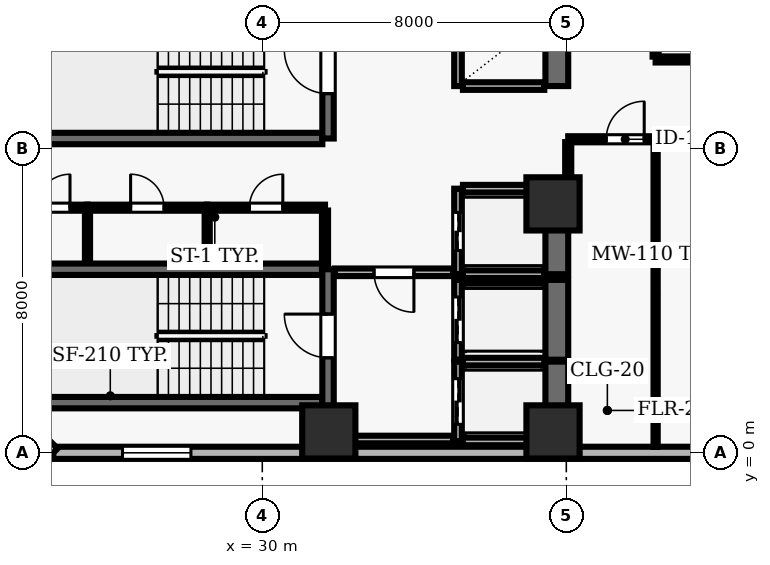
"""IFC4 building model, lengths in metres.
Left out: names, types, materials, properties, quantities, classifications, styles, units other than length and angle.
Written with IfcOpenShell. Run it as: python <this file> out.ifc"""

import sys

from ifc_helpers import new_model, si_unit, direction, frame, frame_2d, origin, origin_2d, place, context, subcontext, project, spatial, rectangle, extrude, element, fill, save


model = new_model("IFC4")
c1 = context("Model", 3, precision=1e-05, world=origin(), true_north=direction((0.0, 1.0)))
c2 = subcontext(c1, "Body", "Model", "MODEL_VIEW")
j1 = project(units=[si_unit("LENGTHUNIT", "METRE"), si_unit("PLANEANGLEUNIT", "RADIAN")], contexts=[c1])
p1 = place(None, origin())
s1 = spatial("IfcSite", under=j1, at=p1, CompositionType="ELEMENT")
p2 = place(p1, origin())
s2 = spatial("IfcBuilding", under=s1, at=p2, CompositionType="ELEMENT")
p3 = place(p2, frame((0.0, 0.0, 31.0)))
s3 = spatial("IfcBuildingStorey", under=s2, at=p3, CompositionType="ELEMENT", Elevation=31.0)
for number, where, z_axis, x_axis in (
    (1, (31.75, 0.55, 0.0), (0.0, 0.0, 1.0), (1.0, 0.0, 0.0)),
    (2, (37.65, 0.55, 0.0), (0.0, 0.0, 1.0), (1.0, 0.0, 0.0)),
    (3, (37.65, 6.55, 0.0), (0.0, 0.0, 1.0), (1.0, 0.0, 0.0)),
):
    element("IfcColumn", number, at=place(p3, frame(where, z_axis=z_axis, x_axis=x_axis)), inside=s3, PredefinedType="COLUMN", context=c2, shape_type="SweptSolid", body=[
        extrude(rectangle(XDim=1.4, YDim=1.4, at=origin_2d()), origin(), (0.0, 0.0, 1.0), 3.9),
    ])
p4 = place(p3, frame((24.5, 0.0, 0.0), z_axis=(0.0, 0.0, 1.0), x_axis=(1.0, 0.0, 0.0)))
e4 = element("IfcWall", 4, at=p4, inside=s3, PredefinedType="SOLIDWALL", context=c2, shape_type="SweptSolid", body=[
    extrude(rectangle(XDim=49.0, YDim=0.32, at=frame_2d((24.5, 0.0))), origin(), (0.0, 0.0, 1.0), 3.69),
])
p5 = place(p4, frame((1.822, 0.0, 0.9)))
e5 = element("IfcOpeningElement", 5, at=p5, cuts=e4, PredefinedType="OPENING", context=c2, shape_type="SweptSolid", body=[
    extrude(rectangle(XDim=1.8, YDim=1.8, at=frame_2d((0.9, 0.9))), frame((0.0, 0.17, 0.0), z_axis=(0.0, -1.0, 0.0), x_axis=(1.0, 0.0, 0.0)), (0.0, 0.0, 1.0), 0.34),
])
p6 = place(p4, frame((18.156, 0.0, 0.9)))
e6 = element("IfcOpeningElement", 6, at=p6, cuts=e4, PredefinedType="OPENING", context=c2, shape_type="SweptSolid", body=[
    extrude(rectangle(XDim=1.8, YDim=1.8, at=frame_2d((0.9, 0.9))), frame((0.0, 0.17, 0.0), z_axis=(0.0, -1.0, 0.0), x_axis=(1.0, 0.0, 0.0)), (0.0, 0.0, 1.0), 0.34),
])
p7 = place(p4, frame((23.6, 0.0, 0.9)))
e7 = element("IfcOpeningElement", 7, at=p7, cuts=e4, PredefinedType="OPENING", context=c2, shape_type="SweptSolid", body=[
    extrude(rectangle(XDim=1.8, YDim=1.8, at=frame_2d((0.9, 0.9))), frame((0.0, 0.17, 0.0), z_axis=(0.0, -1.0, 0.0), x_axis=(1.0, 0.0, 0.0)), (0.0, 0.0, 1.0), 0.34),
])
p8 = place(p4, frame((29.044, 0.0, 0.9)))
e8 = element("IfcOpeningElement", 8, at=p8, cuts=e4, PredefinedType="OPENING", context=c2, shape_type="SweptSolid", body=[
    extrude(rectangle(XDim=1.8, YDim=1.8, at=frame_2d((0.9, 0.9))), frame((0.0, 0.17, 0.0), z_axis=(0.0, -1.0, 0.0), x_axis=(1.0, 0.0, 0.0)), (0.0, 0.0, 1.0), 0.34),
])
p9 = place(p4, frame((34.489, 0.0, 0.9)))
e9 = element("IfcOpeningElement", 9, at=p9, cuts=e4, PredefinedType="OPENING", context=c2, shape_type="SweptSolid", body=[
    extrude(rectangle(XDim=1.8, YDim=1.8, at=frame_2d((0.9, 0.9))), frame((0.0, 0.17, 0.0), z_axis=(0.0, -1.0, 0.0), x_axis=(1.0, 0.0, 0.0)), (0.0, 0.0, 1.0), 0.34),
])
p10 = place(p4, frame((40.383, 0.0, 0.9)))
e10 = element("IfcOpeningElement", 10, at=p10, cuts=e4, PredefinedType="OPENING", context=c2, shape_type="SweptSolid", body=[
    extrude(rectangle(XDim=1.8, YDim=1.8, at=frame_2d((0.9, 0.9))), frame((0.0, 0.17, 0.0), z_axis=(0.0, -1.0, 0.0), x_axis=(1.0, 0.0, 0.0)), (0.0, 0.0, 1.0), 0.34),
])
p11 = place(p4, frame((45.378, 0.0, 0.9)))
e11 = element("IfcOpeningElement", 11, at=p11, cuts=e4, PredefinedType="OPENING", context=c2, shape_type="SweptSolid", body=[
    extrude(rectangle(XDim=1.8, YDim=1.8, at=frame_2d((0.9, 0.9))), frame((0.0, 0.17, 0.0), z_axis=(0.0, -1.0, 0.0), x_axis=(1.0, 0.0, 0.0)), (0.0, 0.0, 1.0), 0.34),
])
p12 = place(p3, frame((22.0, 2.5, 0.0), z_axis=(0.0, 0.0, 1.0), x_axis=(0.707106781187, -0.707106781187, 0.0)))
e12 = element("IfcWall", 12, at=p12, inside=s3, PredefinedType="SOLIDWALL", context=c2, shape_type="SweptSolid", body=[
    extrude(rectangle(XDim=3.536, YDim=0.32, at=frame_2d((1.768, 0.0))), origin(), (0.0, 0.0, 1.0), 3.69),
])
for number, where, z_axis, x_axis in (
    (13, (31.58, 4.83, 0.0), (0.0, 0.0, 1.0), (-1.0, 0.0, 0.0)),
    (14, (23.22, 1.32, 0.0), (0.0, 0.0, 1.0), (1.0, 0.0, 0.0)),
):
    element("IfcWall", number, at=place(p3, frame(where, z_axis=z_axis, x_axis=x_axis)), inside=s3, PredefinedType="SHEAR", context=c2, shape_type="SweptSolid", body=[
        extrude(rectangle(XDim=8.36, YDim=0.3, at=frame_2d((4.18, 0.0))), origin(), (0.0, 0.0, 1.0), 3.69),
    ])
p13 = place(p3, frame((31.73, 0.96, 0.0), z_axis=(0.0, 0.0, 1.0), x_axis=(0.0, 1.0, 0.0)))
e15 = element("IfcWall", 15, at=p13, inside=s3, PredefinedType="SHEAR", context=c2, shape_type="SweptSolid", body=[
    extrude(rectangle(XDim=3.87, YDim=0.3, at=frame_2d((1.935, 0.0))), origin(), (0.0, 0.0, 1.0), 3.69),
])
p14 = place(p13, frame((1.54, 0.0, 0.0)))
e16 = element("IfcOpeningElement", 16, at=p14, cuts=e15, PredefinedType="OPENING", context=c2, shape_type="SweptSolid", body=[
    extrude(rectangle(XDim=1.15, YDim=2.15, at=frame_2d((0.575, 1.075))), frame((0.0, 0.16, 0.0), z_axis=(0.0, -1.0, 0.0), x_axis=(1.0, 0.0, 0.0)), (0.0, 0.0, 1.0), 0.32),
])
p15 = place(p3, frame((23.22, 8.27, 0.0), z_axis=(0.0, 0.0, 1.0), x_axis=(1.0, 0.0, 0.0)))
e17 = element("IfcWall", 17, at=p15, inside=s3, PredefinedType="SHEAR", context=c2, shape_type="SweptSolid", body=[
    extrude(rectangle(XDim=8.36, YDim=0.3, at=frame_2d((4.18, 0.0))), origin(), (0.0, 0.0, 1.0), 3.69),
])
p16 = place(p3, frame((31.73, 8.27, 0.0), z_axis=(0.0, 0.0, 1.0), x_axis=(0.0, 1.0, 0.0)))
e18 = element("IfcWall", 18, at=p16, inside=s3, PredefinedType="SHEAR", context=c2, shape_type="SweptSolid", body=[
    extrude(rectangle(XDim=3.51, YDim=0.3, at=frame_2d((1.755, 0.0))), origin(), (0.0, 0.0, 1.0), 3.69),
])
p17 = place(p16, frame((1.18, 0.0, 0.0)))
e19 = element("IfcOpeningElement", 19, at=p17, cuts=e18, PredefinedType="OPENING", context=c2, shape_type="SweptSolid", body=[
    extrude(rectangle(XDim=1.15, YDim=2.15, at=frame_2d((0.575, 1.075))), frame((0.0, 0.16, 0.0), z_axis=(0.0, -1.0, 0.0), x_axis=(1.0, 0.0, 0.0)), (0.0, 0.0, 1.0), 0.32),
])
p18 = place(p3, frame((35.15, 2.4, 0.0), z_axis=(0.0, 0.0, 1.0), x_axis=(0.0, -1.0, 0.0)))
e20 = element("IfcWall", 20, at=p18, inside=s3, PredefinedType="SOLIDWALL", context=c2, shape_type="SweptSolid", body=[
    extrude(rectangle(XDim=2.1, YDim=0.2, at=frame_2d((1.05, 0.0))), origin(), (0.0, 0.0, 1.0), 3.69),
])
p19 = place(p18, frame((0.45, 0.0, 0.0)))
e21 = element("IfcOpeningElement", 21, at=p19, cuts=e20, PredefinedType="OPENING", context=c2, shape_type="SweptSolid", body=[
    extrude(rectangle(XDim=1.2, YDim=2.15, at=frame_2d((0.6, 1.075))), frame((0.0, 0.11, 0.0), z_axis=(0.0, -1.0, 0.0), x_axis=(1.0, 0.0, 0.0)), (0.0, 0.0, 1.0), 0.22),
])
p20 = place(p3, frame((37.75, 0.3, 0.0), z_axis=(0.0, 0.0, 1.0), x_axis=(0.0, 1.0, 0.0)))
e22 = element("IfcWall", 22, at=p20, inside=s3, PredefinedType="SHEAR", context=c2, shape_type="SweptSolid", body=[
    extrude(rectangle(XDim=2.1, YDim=0.6, at=frame_2d((1.05, 0.0))), origin(), (0.0, 0.0, 1.0), 3.69),
])
for number, where, z_axis, x_axis in (
    (23, (35.28, 0.3, 0.0), (0.0, 0.0, 1.0), (1.0, 0.0, 0.0)),
    (24, (37.42, 2.4, 0.0), (0.0, 0.0, 1.0), (-1.0, 0.0, 0.0)),
):
    element("IfcWall", number, at=place(p3, frame(where, z_axis=z_axis, x_axis=x_axis)), inside=s3, PredefinedType="SOLIDWALL", context=c2, shape_type="SweptSolid", body=[
        extrude(rectangle(XDim=2.14, YDim=0.2, at=frame_2d((1.07, 0.0))), origin(), (0.0, 0.0, 1.0), 3.69),
    ])
p21 = place(p3, frame((35.15, 4.55, 0.0), z_axis=(0.0, 0.0, 1.0), x_axis=(0.0, -1.0, 0.0)))
e25 = element("IfcWall", 25, at=p21, inside=s3, PredefinedType="SOLIDWALL", context=c2, shape_type="SweptSolid", body=[
    extrude(rectangle(XDim=2.1, YDim=0.2, at=frame_2d((1.05, 0.0))), origin(), (0.0, 0.0, 1.0), 3.69),
])
p22 = place(p21, frame((0.45, 0.0, 0.0)))
e26 = element("IfcOpeningElement", 26, at=p22, cuts=e25, PredefinedType="OPENING", context=c2, shape_type="SweptSolid", body=[
    extrude(rectangle(XDim=1.2, YDim=2.15, at=frame_2d((0.6, 1.075))), frame((0.0, 0.11, 0.0), z_axis=(0.0, -1.0, 0.0), x_axis=(1.0, 0.0, 0.0)), (0.0, 0.0, 1.0), 0.22),
])
p23 = place(p3, frame((37.75, 2.45, 0.0), z_axis=(0.0, 0.0, 1.0), x_axis=(0.0, 1.0, 0.0)))
e27 = element("IfcWall", 27, at=p23, inside=s3, PredefinedType="SHEAR", context=c2, shape_type="SweptSolid", body=[
    extrude(rectangle(XDim=2.1, YDim=0.6, at=frame_2d((1.05, 0.0))), origin(), (0.0, 0.0, 1.0), 3.69),
])
p24 = place(p3, frame((37.42, 4.55, 0.0), z_axis=(0.0, 0.0, 1.0), x_axis=(-1.0, 0.0, 0.0)))
e28 = element("IfcWall", 28, at=p24, inside=s3, PredefinedType="SOLIDWALL", context=c2, shape_type="SweptSolid", body=[
    extrude(rectangle(XDim=2.14, YDim=0.2, at=frame_2d((1.07, 0.0))), origin(), (0.0, 0.0, 1.0), 3.69),
])
p25 = place(p3, frame((35.15, 6.95, 0.0), z_axis=(0.0, 0.0, 1.0), x_axis=(0.0, -1.0, 0.0)))
e29 = element("IfcWall", 29, at=p25, inside=s3, PredefinedType="SOLIDWALL", context=c2, shape_type="SweptSolid", body=[
    extrude(rectangle(XDim=2.25, YDim=0.2, at=frame_2d((1.125, 0.0))), origin(), (0.0, 0.0, 1.0), 3.69),
])
p26 = place(p25, frame((0.625, 0.0, 0.0)))
e30 = element("IfcOpeningElement", 30, at=p26, cuts=e29, PredefinedType="OPENING", context=c2, shape_type="SweptSolid", body=[
    extrude(rectangle(XDim=1.0, YDim=2.1, at=frame_2d((0.5, 1.05))), frame((0.0, 0.11, 0.0), z_axis=(0.0, -1.0, 0.0), x_axis=(1.0, 0.0, 0.0)), (0.0, 0.0, 1.0), 0.22),
])
p27 = place(p3, frame((37.75, 4.7, 0.0), z_axis=(0.0, 0.0, 1.0), x_axis=(0.0, 1.0, 0.0)))
e31 = element("IfcWall", 31, at=p27, inside=s3, PredefinedType="SHEAR", context=c2, shape_type="SweptSolid", body=[
    extrude(rectangle(XDim=2.25, YDim=0.6, at=frame_2d((1.125, 0.0))), origin(), (0.0, 0.0, 1.0), 3.69),
])
for number, where, z_axis, x_axis in (
    (32, (35.28, 4.7, 0.0), (0.0, 0.0, 1.0), (1.0, 0.0, 0.0)),
    (33, (37.42, 6.95, 0.0), (0.0, 0.0, 1.0), (-1.0, 0.0, 0.0)),
):
    element("IfcWall", number, at=place(p3, frame(where, z_axis=z_axis, x_axis=x_axis)), inside=s3, PredefinedType="SOLIDWALL", context=c2, shape_type="SweptSolid", body=[
        extrude(rectangle(XDim=2.14, YDim=0.2, at=frame_2d((1.07, 0.0))), origin(), (0.0, 0.0, 1.0), 3.69),
    ])
p28 = place(p3, frame((35.15, 11.55, 0.0), z_axis=(0.0, 0.0, 1.0), x_axis=(0.0, -1.0, 0.0)))
e34 = element("IfcWall", 34, at=p28, inside=s3, PredefinedType="SOLIDWALL", context=c2, shape_type="SweptSolid", body=[
    extrude(rectangle(XDim=1.9, YDim=0.2, at=frame_2d((0.95, 0.0))), origin(), (0.0, 0.0, 1.0), 3.69),
])
p29 = place(p3, frame((37.75, 9.65, 0.0), z_axis=(0.0, 0.0, 1.0), x_axis=(0.0, 1.0, 0.0)))
e35 = element("IfcWall", 35, at=p29, inside=s3, PredefinedType="SHEAR", context=c2, shape_type="SweptSolid", body=[
    extrude(rectangle(XDim=1.9, YDim=0.6, at=frame_2d((0.95, 0.0))), origin(), (0.0, 0.0, 1.0), 3.69),
])
p30 = place(p3, frame((35.28, 9.65, 0.0), z_axis=(0.0, 0.0, 1.0), x_axis=(1.0, 0.0, 0.0)))
e36 = element("IfcWall", 36, at=p30, inside=s3, PredefinedType="SOLIDWALL", context=c2, shape_type="SweptSolid", body=[
    extrude(rectangle(XDim=2.14, YDim=0.2, at=frame_2d((1.07, 0.0))), origin(), (0.0, 0.0, 1.0), 3.69),
])
p31 = place(p3, frame((22.2, 6.45, 0.0), z_axis=(0.0, 0.0, 1.0), x_axis=(1.0, 0.0, 0.0)))
e37 = element("IfcWall", 37, at=p31, inside=s3, PredefinedType="PARTITIONING", context=c2, shape_type="SweptSolid", body=[
    extrude(rectangle(XDim=3.2, YDim=0.16, at=frame_2d((1.6, 0.0))), origin(), (0.0, 0.0, 1.0), 3.69),
])
p32 = place(p31, frame((1.86, 0.0, 0.0)))
e38 = element("IfcOpeningElement", 38, at=p32, cuts=e37, PredefinedType="OPENING", context=c2, shape_type="SweptSolid", body=[
    extrude(rectangle(XDim=0.88, YDim=2.1, at=frame_2d((0.44, 1.05))), frame((0.0, 0.09, 0.0), z_axis=(0.0, -1.0, 0.0), x_axis=(1.0, 0.0, 0.0)), (0.0, 0.0, 1.0), 0.18),
])
p33 = place(p3, frame((25.4, 6.45, 0.0), z_axis=(0.0, 0.0, 1.0), x_axis=(1.0, 0.0, 0.0)))
e39 = element("IfcWall", 39, at=p33, inside=s3, PredefinedType="PARTITIONING", context=c2, shape_type="SweptSolid", body=[
    extrude(rectangle(XDim=3.15, YDim=0.16, at=frame_2d((1.575, 0.0))), origin(), (0.0, 0.0, 1.0), 3.69),
])
p34 = place(p33, frame((1.135, 0.0, 0.0)))
e40 = element("IfcOpeningElement", 40, at=p34, cuts=e39, PredefinedType="OPENING", context=c2, shape_type="SweptSolid", body=[
    extrude(rectangle(XDim=0.88, YDim=2.1, at=frame_2d((0.44, 1.05))), frame((0.0, 0.09, 0.0), z_axis=(0.0, -1.0, 0.0), x_axis=(1.0, 0.0, 0.0)), (0.0, 0.0, 1.0), 0.18),
])
p35 = place(p3, frame((28.55, 6.45, 0.0), z_axis=(0.0, 0.0, 1.0), x_axis=(1.0, 0.0, 0.0)))
e41 = element("IfcWall", 41, at=p35, inside=s3, PredefinedType="PARTITIONING", context=c2, shape_type="SweptSolid", body=[
    extrude(rectangle(XDim=3.1, YDim=0.16, at=frame_2d((1.55, 0.0))), origin(), (0.0, 0.0, 1.0), 3.69),
])
p36 = place(p35, frame((1.11, 0.0, 0.0)))
e42 = element("IfcOpeningElement", 42, at=p36, cuts=e41, PredefinedType="OPENING", context=c2, shape_type="SweptSolid", body=[
    extrude(rectangle(XDim=0.88, YDim=2.1, at=frame_2d((0.44, 1.05))), frame((0.0, 0.09, 0.0), z_axis=(0.0, -1.0, 0.0), x_axis=(1.0, 0.0, 0.0)), (0.0, 0.0, 1.0), 0.18),
])
p37 = place(p3, frame((31.65, 0.35, 0.0), z_axis=(0.0, 0.0, 1.0), x_axis=(1.0, 0.0, 0.0)))
e43 = element("IfcWall", 43, at=p37, inside=s3, PredefinedType="SOLIDWALL", context=c2, shape_type="SweptSolid", body=[
    extrude(rectangle(XDim=3.37, YDim=0.2, at=frame_2d((1.685, 0.0))), origin(), (0.0, 0.0, 1.0), 3.69),
])
p38 = place(p3, frame((35.02, 4.75, 0.0), z_axis=(0.0, 0.0, 1.0), x_axis=(-1.0, 0.0, 0.0)))
e44 = element("IfcWall", 44, at=p38, inside=s3, PredefinedType="SOLIDWALL", context=c2, shape_type="SweptSolid", body=[
    extrude(rectangle(XDim=3.11, YDim=0.2, at=frame_2d((1.555, 0.0))), origin(), (0.0, 0.0, 1.0), 3.69),
])
p39 = place(p38, frame((1.03, 0.0, 0.0)))
e45 = element("IfcOpeningElement", 45, at=p39, cuts=e44, PredefinedType="OPENING", context=c2, shape_type="SweptSolid", body=[
    extrude(rectangle(XDim=1.05, YDim=2.15, at=frame_2d((0.525, 1.075))), frame((0.0, 0.11, 0.0), z_axis=(0.0, -1.0, 0.0), x_axis=(1.0, 0.0, 0.0)), (0.0, 0.0, 1.0), 0.22),
])
p40 = place(p3, frame((38.05, 8.25, 0.0), z_axis=(0.0, 0.0, 1.0), x_axis=(1.0, 0.0, 0.0)))
e46 = element("IfcWall", 46, at=p40, inside=s3, PredefinedType="PARTITIONING", context=c2, shape_type="SweptSolid", body=[
    extrude(rectangle(XDim=2.3, YDim=0.16, at=frame_2d((1.15, 0.0))), origin(), (0.0, 0.0, 1.0), 2.995),
])
p41 = place(p40, frame((1.0, 0.0, 0.0)))
e47 = element("IfcOpeningElement", 47, at=p41, cuts=e46, PredefinedType="OPENING", context=c2, shape_type="SweptSolid", body=[
    extrude(rectangle(XDim=1.0, YDim=2.1, at=frame_2d((0.5, 1.05))), frame((0.0, 0.09, 0.0), z_axis=(0.0, -1.0, 0.0), x_axis=(1.0, 0.0, 0.0)), (0.0, 0.0, 1.0), 0.18),
])
p42 = place(p3, frame((40.35, 8.25, 0.0), z_axis=(0.0, 0.0, 1.0), x_axis=(1.0, 0.0, 0.0)))
e48 = element("IfcWall", 48, at=p42, inside=s3, PredefinedType="PARTITIONING", context=c2, shape_type="SweptSolid", body=[
    extrude(rectangle(XDim=11.65, YDim=0.16, at=frame_2d((5.825, 0.0))), origin(), (0.0, 0.0, 1.0), 2.995),
])
p43 = place(p42, frame((7.475, 0.0, 0.0)))
e49 = element("IfcOpeningElement", 49, at=p43, cuts=e48, PredefinedType="OPENING", context=c2, shape_type="SweptSolid", body=[
    extrude(rectangle(XDim=0.9, YDim=2.1, at=frame_2d((0.45, 1.05))), frame((0.0, 0.09, 0.0), z_axis=(0.0, -1.0, 0.0), x_axis=(1.0, 0.0, 0.0)), (0.0, 0.0, 1.0), 0.18),
])
p44 = place(p3, frame((52.0, 10.35, 0.0), z_axis=(0.0, 0.0, 1.0), x_axis=(-1.0, 0.0, 0.0)))
e50 = element("IfcWall", 50, at=p44, inside=s3, PredefinedType="PARTITIONING", context=c2, shape_type="SweptSolid", body=[
    extrude(rectangle(XDim=11.65, YDim=0.16, at=frame_2d((5.825, 0.0))), origin(), (0.0, 0.0, 1.0), 3.227),
])
p45 = place(p44, frame((5.325, 0.0, 0.0)))
e51 = element("IfcOpeningElement", 51, at=p45, cuts=e50, PredefinedType="OPENING", context=c2, shape_type="SweptSolid", body=[
    extrude(rectangle(XDim=1.0, YDim=2.1, at=frame_2d((0.5, 1.05))), frame((0.0, 0.09, 0.0), z_axis=(0.0, -1.0, 0.0), x_axis=(1.0, 0.0, 0.0)), (0.0, 0.0, 1.0), 0.18),
])
for number, where, z_axis, x_axis in (
    (52, (25.4, 5.01, 0.0), (0.0, 0.0, 1.0), (0.0, 1.0, 0.0)),
    (53, (28.55, 5.01, 0.0), (0.0, 0.0, 1.0), (0.0, 1.0, 0.0)),
):
    element("IfcWall", number, at=place(p3, frame(where, z_axis=z_axis, x_axis=x_axis)), inside=s3, PredefinedType="PARTITIONING", context=c2, shape_type="SweptSolid", body=[
        extrude(rectangle(XDim=1.365, YDim=0.135, at=frame_2d((0.683, 0.0))), origin(), (0.0, 0.0, 1.0), 3.69),
    ])
p46 = place(p3, frame((31.65, 4.86, 0.0), z_axis=(0.0, 0.0, 1.0), x_axis=(0.0, 1.0, 0.0)))
e54 = element("IfcWall", 54, at=p46, inside=s3, PredefinedType="PARTITIONING", context=c2, shape_type="SweptSolid", body=[
    extrude(rectangle(XDim=1.515, YDim=0.16, at=frame_2d((0.757, 0.0))), origin(), (0.0, 0.0, 1.0), 3.69),
])
p47 = place(p3, frame((38.05, 7.05, 0.0), z_axis=(0.0, 0.0, 1.0), x_axis=(0.0, 1.0, 0.0)))
e55 = element("IfcWall", 55, at=p47, inside=s3, PredefinedType="PARTITIONING", context=c2, shape_type="SweptSolid", body=[
    extrude(rectangle(XDim=1.125, YDim=0.16, at=frame_2d((0.562, 0.0))), origin(), (0.0, 0.0, 1.0), 2.995),
])
p48 = place(p3, frame((40.35, 0.155, 0.0), z_axis=(0.0, 0.0, 1.0), x_axis=(0.0, 1.0, 0.0)))
e56 = element("IfcWall", 56, at=p48, inside=s3, PredefinedType="MOVABLE", context=c2, shape_type="SweptSolid", body=[
    extrude(rectangle(XDim=8.02, YDim=0.11, at=frame_2d((4.01, 0.0))), origin(), (0.0, 0.0, 1.0), 3.69),
])
p49 = place(p3, frame((40.35, 10.425, 0.0), z_axis=(0.0, 0.0, 1.0), x_axis=(0.0, 1.0, 0.0)))
e57 = element("IfcWall", 57, at=p49, inside=s3, PredefinedType="PARTITIONING", context=c2, shape_type="SweptSolid", body=[
    extrude(rectangle(XDim=5.5, YDim=0.16, at=frame_2d((2.75, 0.0))), origin(), (0.0, 0.0, 1.0), 3.227),
])
p50 = place(p5, origin())
e58 = element("IfcWindow", 58, at=p50, inside=s3, PartitioningType="SINGLE_PANEL", PredefinedType="WINDOW", context=c2, shape_type="SweptSolid", body=[
    extrude(rectangle(XDim=1.8, YDim=1.8, at=frame_2d((0.9, 0.9))), frame((0.0, 0.03, 0.0), z_axis=(0.0, -1.0, 0.0), x_axis=(1.0, 0.0, 0.0)), (0.0, 0.0, 1.0), 0.06),
])
fill(e5, e58)
p51 = place(p14, origin())
e59 = element("IfcDoor", 59, at=p51, inside=s3, OperationType="SINGLE_SWING_RIGHT", PredefinedType="DOOR", context=c2, shape_type="SweptSolid", body=[
    extrude(rectangle(XDim=1.15, YDim=2.15, at=frame_2d((0.575, 1.075))), frame((0.0, 0.025, 0.0), z_axis=(0.0, -1.0, 0.0), x_axis=(1.0, 0.0, 0.0)), (0.0, 0.0, 1.0), 0.05),
])
fill(e16, e59)
p52 = place(p17, origin())
e60 = element("IfcDoor", 60, at=p52, inside=s3, OperationType="SINGLE_SWING_RIGHT", PredefinedType="DOOR", context=c2, shape_type="SweptSolid", body=[
    extrude(rectangle(XDim=1.15, YDim=2.15, at=frame_2d((0.575, 1.075))), frame((0.0, 0.025, 0.0), z_axis=(0.0, -1.0, 0.0), x_axis=(1.0, 0.0, 0.0)), (0.0, 0.0, 1.0), 0.05),
])
fill(e19, e60)
p53 = place(p19, origin())
e61 = element("IfcDoor", 61, at=p53, inside=s3, OperationType="DOUBLE_DOOR_SLIDING", PredefinedType="DOOR", context=c2, shape_type="SweptSolid", body=[
    extrude(rectangle(XDim=1.2, YDim=2.15, at=frame_2d((0.6, 1.075))), frame((0.0, 0.025, 0.0), z_axis=(0.0, -1.0, 0.0), x_axis=(1.0, 0.0, 0.0)), (0.0, 0.0, 1.0), 0.05),
])
fill(e21, e61)
p54 = place(p22, origin())
e62 = element("IfcDoor", 62, at=p54, inside=s3, OperationType="DOUBLE_DOOR_SLIDING", PredefinedType="DOOR", context=c2, shape_type="SweptSolid", body=[
    extrude(rectangle(XDim=1.2, YDim=2.15, at=frame_2d((0.6, 1.075))), frame((0.0, 0.025, 0.0), z_axis=(0.0, -1.0, 0.0), x_axis=(1.0, 0.0, 0.0)), (0.0, 0.0, 1.0), 0.05),
])
fill(e26, e62)
p55 = place(p26, origin())
e63 = element("IfcDoor", 63, at=p55, inside=s3, OperationType="DOUBLE_DOOR_SLIDING", PredefinedType="DOOR", context=c2, shape_type="SweptSolid", body=[
    extrude(rectangle(XDim=1.0, YDim=2.1, at=frame_2d((0.5, 1.05))), frame((0.0, 0.025, 0.0), z_axis=(0.0, -1.0, 0.0), x_axis=(1.0, 0.0, 0.0)), (0.0, 0.0, 1.0), 0.05),
])
fill(e30, e63)
p56 = place(p39, origin())
e64 = element("IfcDoor", 64, at=p56, inside=s3, OperationType="SINGLE_SWING_LEFT", PredefinedType="DOOR", context=c2, shape_type="SweptSolid", body=[
    extrude(rectangle(XDim=1.05, YDim=2.15, at=frame_2d((0.525, 1.075))), frame((0.0, 0.025, 0.0), z_axis=(0.0, -1.0, 0.0), x_axis=(1.0, 0.0, 0.0)), (0.0, 0.0, 1.0), 0.05),
])
fill(e45, e64)
p57 = place(p32, origin())
e65 = element("IfcDoor", 65, at=p57, inside=s3, OperationType="SINGLE_SWING_RIGHT", PredefinedType="DOOR", context=c2, shape_type="SweptSolid", body=[
    extrude(rectangle(XDim=0.88, YDim=2.1, at=frame_2d((0.44, 1.05))), frame((0.0, 0.025, 0.0), z_axis=(0.0, -1.0, 0.0), x_axis=(1.0, 0.0, 0.0)), (0.0, 0.0, 1.0), 0.05),
])
fill(e38, e65)
p58 = place(p34, origin())
e66 = element("IfcDoor", 66, at=p58, inside=s3, OperationType="SINGLE_SWING_LEFT", PredefinedType="DOOR", context=c2, shape_type="SweptSolid", body=[
    extrude(rectangle(XDim=0.88, YDim=2.1, at=frame_2d((0.44, 1.05))), frame((0.0, 0.025, 0.0), z_axis=(0.0, -1.0, 0.0), x_axis=(1.0, 0.0, 0.0)), (0.0, 0.0, 1.0), 0.05),
])
fill(e40, e66)
p59 = place(p36, origin())
e67 = element("IfcDoor", 67, at=p59, inside=s3, OperationType="SINGLE_SWING_RIGHT", PredefinedType="DOOR", context=c2, shape_type="SweptSolid", body=[
    extrude(rectangle(XDim=0.88, YDim=2.1, at=frame_2d((0.44, 1.05))), frame((0.0, 0.025, 0.0), z_axis=(0.0, -1.0, 0.0), x_axis=(1.0, 0.0, 0.0)), (0.0, 0.0, 1.0), 0.05),
])
fill(e42, e67)
p60 = place(p41, origin())
e68 = element("IfcDoor", 68, at=p60, inside=s3, OperationType="SINGLE_SWING_RIGHT", PredefinedType="DOOR", context=c2, shape_type="SweptSolid", body=[
    extrude(rectangle(XDim=1.0, YDim=2.1, at=frame_2d((0.5, 1.05))), frame((0.0, 0.025, 0.0), z_axis=(0.0, -1.0, 0.0), x_axis=(1.0, 0.0, 0.0)), (0.0, 0.0, 1.0), 0.05),
])
fill(e47, e68)
save(model, sys.argv[1])
